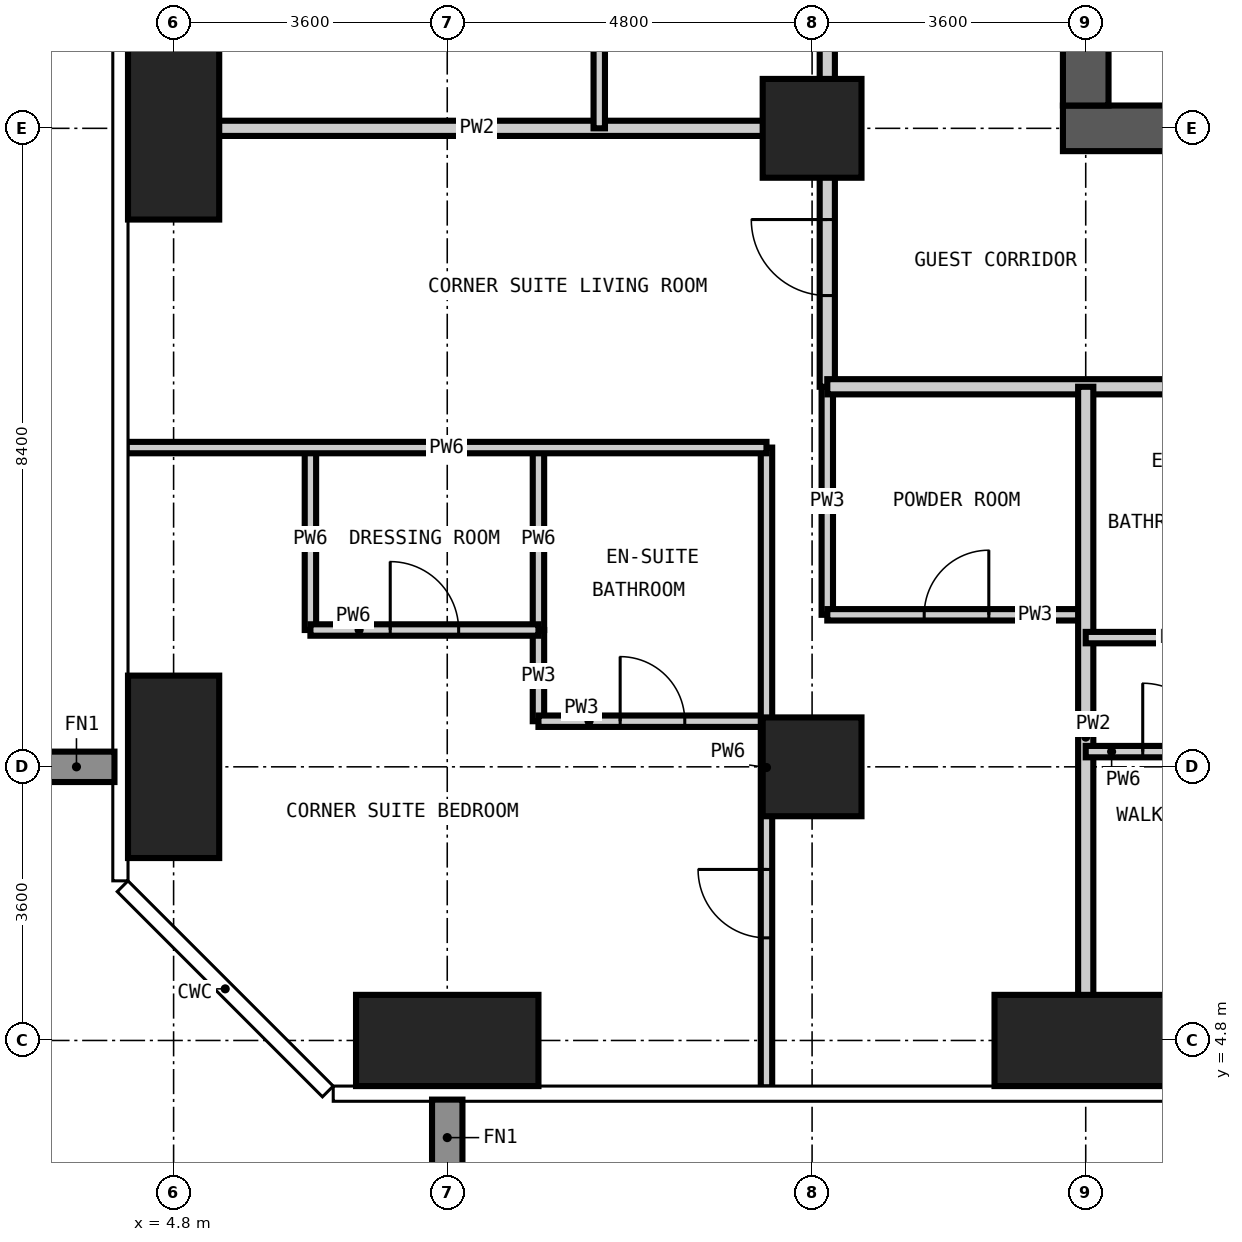
"""IFC4 building model, lengths in metres.
Left out: names, types, materials, properties, quantities, classifications, styles, units other than length and angle.
Written with IfcOpenShell. Run it as: python <this file> out.ifc"""

import sys

from ifc_helpers import new_model, si_unit, direction, frame, frame_2d, origin, origin_2d, place, context, subcontext, project, spatial, rectangle, extrude, element, fill, save


model = new_model("IFC4")
c1 = context("Model", 3, precision=1e-05, world=origin(), true_north=direction((0.0, 1.0)))
c2 = subcontext(c1, "Body", "Model", "MODEL_VIEW")
j1 = project(units=[si_unit("LENGTHUNIT", "METRE"), si_unit("PLANEANGLEUNIT", "RADIAN")], contexts=[c1])
p1 = place(None, origin())
s1 = spatial("IfcSite", under=j1, at=p1, CompositionType="ELEMENT")
p2 = place(p1, origin())
s2 = spatial("IfcBuilding", under=s1, at=p2, CompositionType="ELEMENT")
p3 = place(p2, frame((0.0, 0.0, 198.6)))
s3 = spatial("IfcBuildingStorey", under=s2, at=p3, CompositionType="ELEMENT", Elevation=198.6)
for number, where, z_axis, x_axis in (
    (1, (4.8, 8.4, -0.35), (0.0, 0.0, 1.0), (1.0, 0.0, 0.0)),
    (2, (4.8, 16.8, -0.35), (0.0, 0.0, 1.0), (1.0, 0.0, 0.0)),
):
    element("IfcColumn", number, at=place(p3, frame(where, z_axis=z_axis, x_axis=x_axis)), inside=s3, PredefinedType="COLUMN", context=c2, shape_type="SweptSolid", body=[
        extrude(rectangle(XDim=1.2, YDim=2.4, at=origin_2d()), origin(), (0.0, 0.0, 1.0), 3.6),
    ])
p4 = place(p3, frame((8.4, 4.8, -0.35), z_axis=(0.0, 0.0, 1.0), x_axis=(1.0, 0.0, 0.0)))
e3 = element("IfcColumn", 3, at=p4, inside=s3, PredefinedType="COLUMN", context=c2, shape_type="SweptSolid", body=[
    extrude(rectangle(XDim=2.4, YDim=1.2, at=origin_2d()), origin(), (0.0, 0.0, 1.0), 3.6),
])
for number, where, z_axis, x_axis in (
    (4, (13.2, 8.4, -0.35), (0.0, 0.0, 1.0), (1.0, 0.0, 0.0)),
    (5, (13.2, 16.8, -0.35), (0.0, 0.0, 1.0), (1.0, 0.0, 0.0)),
):
    element("IfcColumn", number, at=place(p3, frame(where, z_axis=z_axis, x_axis=x_axis)), inside=s3, PredefinedType="COLUMN", context=c2, shape_type="SweptSolid", body=[
        extrude(rectangle(XDim=1.3, YDim=1.3, at=origin_2d()), origin(), (0.0, 0.0, 1.0), 3.6),
    ])
p5 = place(p3, frame((16.8, 4.8, -0.35), z_axis=(0.0, 0.0, 1.0), x_axis=(1.0, 0.0, 0.0)))
e6 = element("IfcColumn", 6, at=p5, inside=s3, PredefinedType="COLUMN", context=c2, shape_type="SweptSolid", body=[
    extrude(rectangle(XDim=2.4, YDim=1.2, at=origin_2d()), origin(), (0.0, 0.0, 1.0), 3.6),
])
p6 = place(p3, frame((16.5, 16.8, -0.35), z_axis=(0.0, 0.0, 1.0), x_axis=(1.0, 0.0, 0.0)))
e7 = element("IfcWall", 7, at=p6, inside=s3, PredefinedType="SHEAR", context=c2, shape_type="SweptSolid", body=[
    extrude(rectangle(XDim=25.8, YDim=0.6, at=frame_2d((12.9, 0.0))), origin(), (0.0, 0.0, 1.0), 3.6),
])
p7 = place(p6, frame((12.4, 0.0, 0.35)))
e8 = element("IfcOpeningElement", 8, at=p7, cuts=e7, PredefinedType="OPENING", context=c2, shape_type="SweptSolid", body=[
    extrude(rectangle(XDim=1.0, YDim=2.1, at=frame_2d((0.5, 1.05))), frame((0.0, 0.31, 0.0), z_axis=(0.0, -1.0, 0.0), x_axis=(1.0, 0.0, 0.0)), (0.0, 0.0, 1.0), 0.62),
])
p8 = place(p6, frame((18.7, 0.0, 0.35)))
e9 = element("IfcOpeningElement", 9, at=p8, cuts=e7, PredefinedType="OPENING", context=c2, shape_type="SweptSolid", body=[
    extrude(rectangle(XDim=1.0, YDim=2.1, at=frame_2d((0.5, 1.05))), frame((0.0, 0.31, 0.0), z_axis=(0.0, -1.0, 0.0), x_axis=(1.0, 0.0, 0.0)), (0.0, 0.0, 1.0), 0.62),
])
p9 = place(p3, frame((16.8, 41.7, -0.35), z_axis=(0.0, 0.0, 1.0), x_axis=(0.0, -1.0, 0.0)))
e10 = element("IfcWall", 10, at=p9, inside=s3, PredefinedType="SHEAR", context=c2, shape_type="SweptSolid", body=[
    extrude(rectangle(XDim=24.6, YDim=0.6, at=frame_2d((12.3, 0.0))), origin(), (0.0, 0.0, 1.0), 3.6),
])
p10 = place(p9, frame((11.4, 0.0, 0.35)))
e11 = element("IfcOpeningElement", 11, at=p10, cuts=e10, PredefinedType="OPENING", context=c2, shape_type="SweptSolid", body=[
    extrude(rectangle(XDim=1.8, YDim=2.2, at=frame_2d((0.9, 1.1))), frame((0.0, 0.31, 0.0), z_axis=(0.0, -1.0, 0.0), x_axis=(1.0, 0.0, 0.0)), (0.0, 0.0, 1.0), 0.62),
])
p11 = place(p9, frame((20.2, 0.0, 0.35)))
e12 = element("IfcOpeningElement", 12, at=p11, cuts=e10, PredefinedType="OPENING", context=c2, shape_type="SweptSolid", body=[
    extrude(rectangle(XDim=1.0, YDim=2.1, at=frame_2d((0.5, 1.05))), frame((0.0, 0.31, 0.0), z_axis=(0.0, -1.0, 0.0), x_axis=(1.0, 0.0, 0.0)), (0.0, 0.0, 1.0), 0.62),
])
p12 = place(p9, frame((5.5, 0.0, 0.35)))
e13 = element("IfcOpeningElement", 13, at=p12, cuts=e10, PredefinedType="OPENING", context=c2, shape_type="SweptSolid", body=[
    extrude(rectangle(XDim=1.0, YDim=2.1, at=frame_2d((0.5, 1.05))), frame((0.0, 0.31, 0.0), z_axis=(0.0, -1.0, 0.0), x_axis=(1.0, 0.0, 0.0)), (0.0, 0.0, 1.0), 0.62),
])
p13 = place(p3, frame((9.6, 9.0, 0.0), z_axis=(0.0, 0.0, 1.0), x_axis=(0.0, 1.0, 0.0)))
e14 = element("IfcWall", 14, at=p13, inside=s3, PredefinedType="PARTITIONING", context=c2, shape_type="SweptSolid", body=[
    extrude(rectangle(XDim=1.2, YDim=0.15, at=frame_2d((0.6, 0.0))), origin(), (0.0, 0.0, 1.0), 3.25),
])
p14 = place(p3, frame((13.4, 10.4, 0.0), z_axis=(0.0, 0.0, 1.0), x_axis=(0.0, 1.0, 0.0)))
e15 = element("IfcWall", 15, at=p14, inside=s3, PredefinedType="PARTITIONING", context=c2, shape_type="SweptSolid", body=[
    extrude(rectangle(XDim=3.0, YDim=0.15, at=frame_2d((1.5, 0.0))), origin(), (0.0, 0.0, 1.0), 3.25),
])
p15 = place(p3, frame((9.6, 9.0, 0.0), z_axis=(0.0, 0.0, 1.0), x_axis=(1.0, 0.0, 0.0)))
e16 = element("IfcWall", 16, at=p15, inside=s3, PredefinedType="PARTITIONING", context=c2, shape_type="SweptSolid", body=[
    extrude(rectangle(XDim=3.0, YDim=0.15, at=frame_2d((1.5, 0.0))), origin(), (0.0, 0.0, 1.0), 3.25),
])
p16 = place(p15, frame((1.075, 0.0, 0.0)))
e17 = element("IfcOpeningElement", 17, at=p16, cuts=e16, PredefinedType="OPENING", context=c2, shape_type="SweptSolid", body=[
    extrude(rectangle(XDim=0.85, YDim=2.1, at=frame_2d((0.425, 1.05))), frame((0.0, 0.085, 0.0), z_axis=(0.0, -1.0, 0.0), x_axis=(1.0, 0.0, 0.0)), (0.0, 0.0, 1.0), 0.17),
])
p17 = place(p3, frame((13.4, 10.4, 0.0), z_axis=(0.0, 0.0, 1.0), x_axis=(1.0, 0.0, 0.0)))
e18 = element("IfcWall", 18, at=p17, inside=s3, PredefinedType="PARTITIONING", context=c2, shape_type="SweptSolid", body=[
    extrude(rectangle(XDim=3.4, YDim=0.15, at=frame_2d((1.7, 0.0))), origin(), (0.0, 0.0, 1.0), 3.25),
])
p18 = place(p17, frame((1.275, 0.0, 0.0)))
e19 = element("IfcOpeningElement", 19, at=p18, cuts=e18, PredefinedType="OPENING", context=c2, shape_type="SweptSolid", body=[
    extrude(rectangle(XDim=0.85, YDim=2.1, at=frame_2d((0.425, 1.05))), frame((0.0, 0.085, 0.0), z_axis=(0.0, -1.0, 0.0), x_axis=(1.0, 0.0, 0.0)), (0.0, 0.0, 1.0), 0.17),
])
p19 = place(p3, frame((13.4, 13.4, 0.0), z_axis=(0.0, 0.0, 1.0), x_axis=(0.0, 1.0, 0.0)))
e20 = element("IfcWall", 20, at=p19, inside=s3, PredefinedType="PARTITIONING", context=c2, shape_type="SweptSolid", body=[
    extrude(rectangle(XDim=31.4, YDim=0.2, at=frame_2d((15.7, 0.0))), origin(), (0.0, 0.0, 1.0), 3.25),
])
p20 = place(p19, frame((6.2, 0.0, 0.0)))
e21 = element("IfcOpeningElement", 21, at=p20, cuts=e20, PredefinedType="OPENING", context=c2, shape_type="SweptSolid", body=[
    extrude(rectangle(XDim=1.0, YDim=2.2, at=frame_2d((0.5, 1.1))), frame((0.0, 0.11, 0.0), z_axis=(0.0, -1.0, 0.0), x_axis=(1.0, 0.0, 0.0)), (0.0, 0.0, 1.0), 0.22),
])
p21 = place(p19, frame((14.6, 0.0, 0.0)))
e22 = element("IfcOpeningElement", 22, at=p21, cuts=e20, PredefinedType="OPENING", context=c2, shape_type="SweptSolid", body=[
    extrude(rectangle(XDim=1.0, YDim=2.2, at=frame_2d((0.5, 1.1))), frame((0.0, 0.11, 0.0), z_axis=(0.0, -1.0, 0.0), x_axis=(1.0, 0.0, 0.0)), (0.0, 0.0, 1.0), 0.22),
])
p22 = place(p19, frame((23.0, 0.0, 0.0)))
e23 = element("IfcOpeningElement", 23, at=p22, cuts=e20, PredefinedType="OPENING", context=c2, shape_type="SweptSolid", body=[
    extrude(rectangle(XDim=1.0, YDim=2.2, at=frame_2d((0.5, 1.1))), frame((0.0, 0.11, 0.0), z_axis=(0.0, -1.0, 0.0), x_axis=(1.0, 0.0, 0.0)), (0.0, 0.0, 1.0), 0.22),
])
p23 = place(p19, frame((1.2, 0.0, 0.0)))
e24 = element("IfcOpeningElement", 24, at=p23, cuts=e20, PredefinedType="OPENING", context=c2, shape_type="SweptSolid", body=[
    extrude(rectangle(XDim=1.0, YDim=2.2, at=frame_2d((0.5, 1.1))), frame((0.0, 0.11, 0.0), z_axis=(0.0, -1.0, 0.0), x_axis=(1.0, 0.0, 0.0)), (0.0, 0.0, 1.0), 0.22),
])
p24 = place(p19, frame((29.5, 0.0, 0.0)))
e25 = element("IfcOpeningElement", 25, at=p24, cuts=e20, PredefinedType="OPENING", context=c2, shape_type="SweptSolid", body=[
    extrude(rectangle(XDim=1.0, YDim=2.2, at=frame_2d((0.5, 1.1))), frame((0.0, 0.11, 0.0), z_axis=(0.0, -1.0, 0.0), x_axis=(1.0, 0.0, 0.0)), (0.0, 0.0, 1.0), 0.22),
])
p25 = place(p3, frame((44.2, 13.4, 0.0), z_axis=(0.0, 0.0, 1.0), x_axis=(-1.0, 0.0, 0.0)))
e26 = element("IfcWall", 26, at=p25, inside=s3, PredefinedType="PARTITIONING", context=c2, shape_type="SweptSolid", body=[
    extrude(rectangle(XDim=30.8, YDim=0.2, at=frame_2d((15.4, 0.0))), origin(), (0.0, 0.0, 1.0), 3.25),
])
p26 = place(p25, frame((23.6, 0.0, 0.0)))
e27 = element("IfcOpeningElement", 27, at=p26, cuts=e26, PredefinedType="OPENING", context=c2, shape_type="SweptSolid", body=[
    extrude(rectangle(XDim=1.0, YDim=2.2, at=frame_2d((0.5, 1.1))), frame((0.0, 0.11, 0.0), z_axis=(0.0, -1.0, 0.0), x_axis=(1.0, 0.0, 0.0)), (0.0, 0.0, 1.0), 0.22),
])
p27 = place(p25, frame((21.8, 0.0, 0.0)))
e28 = element("IfcOpeningElement", 28, at=p27, cuts=e26, PredefinedType="OPENING", context=c2, shape_type="SweptSolid", body=[
    extrude(rectangle(XDim=1.0, YDim=2.2, at=frame_2d((0.5, 1.1))), frame((0.0, 0.11, 0.0), z_axis=(0.0, -1.0, 0.0), x_axis=(1.0, 0.0, 0.0)), (0.0, 0.0, 1.0), 0.22),
])
p28 = place(p25, frame((15.5, 0.0, 0.0)))
e29 = element("IfcOpeningElement", 29, at=p28, cuts=e26, PredefinedType="OPENING", context=c2, shape_type="SweptSolid", body=[
    extrude(rectangle(XDim=1.0, YDim=2.2, at=frame_2d((0.5, 1.1))), frame((0.0, 0.11, 0.0), z_axis=(0.0, -1.0, 0.0), x_axis=(1.0, 0.0, 0.0)), (0.0, 0.0, 1.0), 0.22),
])
p29 = place(p25, frame((5.0, 0.0, 0.0)))
e30 = element("IfcOpeningElement", 30, at=p29, cuts=e26, PredefinedType="OPENING", context=c2, shape_type="SweptSolid", body=[
    extrude(rectangle(XDim=1.0, YDim=2.2, at=frame_2d((0.5, 1.1))), frame((0.0, 0.11, 0.0), z_axis=(0.0, -1.0, 0.0), x_axis=(1.0, 0.0, 0.0)), (0.0, 0.0, 1.0), 0.22),
])
for number, where, z_axis, x_axis in (
    (31, (16.8, 4.182, 0.0), (0.0, 0.0, 1.0), (0.0, 1.0, 0.0)),
    (32, (4.182, 16.8, 0.0), (0.0, 0.0, 1.0), (1.0, 0.0, 0.0)),
):
    element("IfcWall", number, at=place(p3, frame(where, z_axis=z_axis, x_axis=x_axis)), inside=s3, PredefinedType="PARTITIONING", context=c2, shape_type="SweptSolid", body=[
        extrude(rectangle(XDim=9.218, YDim=0.2, at=frame_2d((4.609, 0.0))), origin(), (0.0, 0.0, 1.0), 3.25),
    ])
for number, where, z_axis, x_axis in (
    (33, (6.6, 10.2, 0.0), (0.0, 0.0, 1.0), (0.0, 1.0, 0.0)),
    (34, (9.6, 10.2, 0.0), (0.0, 0.0, 1.0), (0.0, 1.0, 0.0)),
):
    element("IfcWall", number, at=place(p3, frame(where, z_axis=z_axis, x_axis=x_axis)), inside=s3, PredefinedType="PARTITIONING", context=c2, shape_type="SweptSolid", body=[
        extrude(rectangle(XDim=2.4, YDim=0.15, at=frame_2d((1.2, 0.0))), origin(), (0.0, 0.0, 1.0), 3.25),
    ])
p30 = place(p3, frame((10.4, 16.8, 0.0), z_axis=(0.0, 0.0, 1.0), x_axis=(0.0, 1.0, 0.0)))
e35 = element("IfcWall", 35, at=p30, inside=s3, PredefinedType="PARTITIONING", context=c2, shape_type="SweptSolid", body=[
    extrude(rectangle(XDim=2.4, YDim=0.15, at=frame_2d((1.2, 0.0))), origin(), (0.0, 0.0, 1.0), 3.25),
])
p31 = place(p3, frame((12.6, 4.182, 0.0), z_axis=(0.0, 0.0, 1.0), x_axis=(0.0, 1.0, 0.0)))
e36 = element("IfcWall", 36, at=p31, inside=s3, PredefinedType="PARTITIONING", context=c2, shape_type="SweptSolid", body=[
    extrude(rectangle(XDim=8.418, YDim=0.15, at=frame_2d((4.209, 0.0))), origin(), (0.0, 0.0, 1.0), 3.25),
])
p32 = place(p31, frame((1.968, 0.0, 0.0)))
e37 = element("IfcOpeningElement", 37, at=p32, cuts=e36, PredefinedType="OPENING", context=c2, shape_type="SweptSolid", body=[
    extrude(rectangle(XDim=0.9, YDim=2.1, at=frame_2d((0.45, 1.05))), frame((0.0, 0.085, 0.0), z_axis=(0.0, -1.0, 0.0), x_axis=(1.0, 0.0, 0.0)), (0.0, 0.0, 1.0), 0.17),
])
p33 = place(p3, frame((16.8, 8.6, 0.0), z_axis=(0.0, 0.0, 1.0), x_axis=(1.0, 0.0, 0.0)))
e38 = element("IfcWall", 38, at=p33, inside=s3, PredefinedType="PARTITIONING", context=c2, shape_type="SweptSolid", body=[
    extrude(rectangle(XDim=2.4, YDim=0.15, at=frame_2d((1.2, 0.0))), origin(), (0.0, 0.0, 1.0), 3.25),
])
p34 = place(p33, frame((0.75, 0.0, 0.0)))
e39 = element("IfcOpeningElement", 39, at=p34, cuts=e38, PredefinedType="OPENING", context=c2, shape_type="SweptSolid", body=[
    extrude(rectangle(XDim=0.9, YDim=2.1, at=frame_2d((0.45, 1.05))), frame((0.0, 0.085, 0.0), z_axis=(0.0, -1.0, 0.0), x_axis=(1.0, 0.0, 0.0)), (0.0, 0.0, 1.0), 0.17),
])
p35 = place(p3, frame((16.8, 10.1, 0.0), z_axis=(0.0, 0.0, 1.0), x_axis=(1.0, 0.0, 0.0)))
e40 = element("IfcWall", 40, at=p35, inside=s3, PredefinedType="PARTITIONING", context=c2, shape_type="SweptSolid", body=[
    extrude(rectangle(XDim=2.4, YDim=0.15, at=frame_2d((1.2, 0.0))), origin(), (0.0, 0.0, 1.0), 3.25),
])
p36 = place(p3, frame((6.6, 10.2, 0.0), z_axis=(0.0, 0.0, 1.0), x_axis=(1.0, 0.0, 0.0)))
e41 = element("IfcWall", 41, at=p36, inside=s3, PredefinedType="PARTITIONING", context=c2, shape_type="SweptSolid", body=[
    extrude(rectangle(XDim=3.0, YDim=0.15, at=frame_2d((1.5, 0.0))), origin(), (0.0, 0.0, 1.0), 3.25),
])
p37 = place(p36, frame((1.05, 0.0, 0.0)))
e42 = element("IfcOpeningElement", 42, at=p37, cuts=e41, PredefinedType="OPENING", context=c2, shape_type="SweptSolid", body=[
    extrude(rectangle(XDim=0.9, YDim=2.1, at=frame_2d((0.45, 1.05))), frame((0.0, 0.085, 0.0), z_axis=(0.0, -1.0, 0.0), x_axis=(1.0, 0.0, 0.0)), (0.0, 0.0, 1.0), 0.17),
])
p38 = place(p3, frame((4.182, 12.6, 0.0), z_axis=(0.0, 0.0, 1.0), x_axis=(1.0, 0.0, 0.0)))
e43 = element("IfcWall", 43, at=p38, inside=s3, PredefinedType="PARTITIONING", context=c2, shape_type="SweptSolid", body=[
    extrude(rectangle(XDim=8.418, YDim=0.15, at=frame_2d((4.209, 0.0))), origin(), (0.0, 0.0, 1.0), 3.25),
])
p39 = place(p34, origin())
e44 = element("IfcDoor", 44, at=p39, inside=s3, OperationType="SINGLE_SWING_LEFT", PredefinedType="DOOR", context=c2, shape_type="SweptSolid", body=[
    extrude(rectangle(XDim=0.9, YDim=2.1, at=frame_2d((0.45, 1.05))), frame((0.0, 0.025, 0.0), z_axis=(0.0, -1.0, 0.0), x_axis=(1.0, 0.0, 0.0)), (0.0, 0.0, 1.0), 0.05),
])
fill(e39, e44)
p40 = place(p23, origin())
e45 = element("IfcDoor", 45, at=p40, inside=s3, OperationType="SINGLE_SWING_RIGHT", PredefinedType="DOOR", context=c2, shape_type="SweptSolid", body=[
    extrude(rectangle(XDim=1.0, YDim=2.2, at=frame_2d((0.5, 1.1))), frame((0.0, 0.025, 0.0), z_axis=(0.0, -1.0, 0.0), x_axis=(1.0, 0.0, 0.0)), (0.0, 0.0, 1.0), 0.05),
])
fill(e24, e45)
p41 = place(p18, origin())
e46 = element("IfcDoor", 46, at=p41, inside=s3, OperationType="SINGLE_SWING_RIGHT", PredefinedType="DOOR", context=c2, shape_type="SweptSolid", body=[
    extrude(rectangle(XDim=0.85, YDim=2.1, at=frame_2d((0.425, 1.05))), frame((0.0, 0.025, 0.0), z_axis=(0.0, -1.0, 0.0), x_axis=(1.0, 0.0, 0.0)), (0.0, 0.0, 1.0), 0.05),
])
fill(e19, e46)
p42 = place(p32, origin())
e47 = element("IfcDoor", 47, at=p42, inside=s3, OperationType="SINGLE_SWING_RIGHT", PredefinedType="DOOR", context=c2, shape_type="SweptSolid", body=[
    extrude(rectangle(XDim=0.9, YDim=2.1, at=frame_2d((0.45, 1.05))), frame((0.0, 0.025, 0.0), z_axis=(0.0, -1.0, 0.0), x_axis=(1.0, 0.0, 0.0)), (0.0, 0.0, 1.0), 0.05),
])
fill(e37, e47)
p43 = place(p16, origin())
e48 = element("IfcDoor", 48, at=p43, inside=s3, OperationType="SINGLE_SWING_LEFT", PredefinedType="DOOR", context=c2, shape_type="SweptSolid", body=[
    extrude(rectangle(XDim=0.85, YDim=2.1, at=frame_2d((0.425, 1.05))), frame((0.0, 0.025, 0.0), z_axis=(0.0, -1.0, 0.0), x_axis=(1.0, 0.0, 0.0)), (0.0, 0.0, 1.0), 0.05),
])
fill(e17, e48)
p44 = place(p37, origin())
e49 = element("IfcDoor", 49, at=p44, inside=s3, OperationType="SINGLE_SWING_LEFT", PredefinedType="DOOR", context=c2, shape_type="SweptSolid", body=[
    extrude(rectangle(XDim=0.9, YDim=2.1, at=frame_2d((0.45, 1.05))), frame((0.0, 0.025, 0.0), z_axis=(0.0, -1.0, 0.0), x_axis=(1.0, 0.0, 0.0)), (0.0, 0.0, 1.0), 0.05),
])
fill(e42, e49)
save(model, sys.argv[1])
